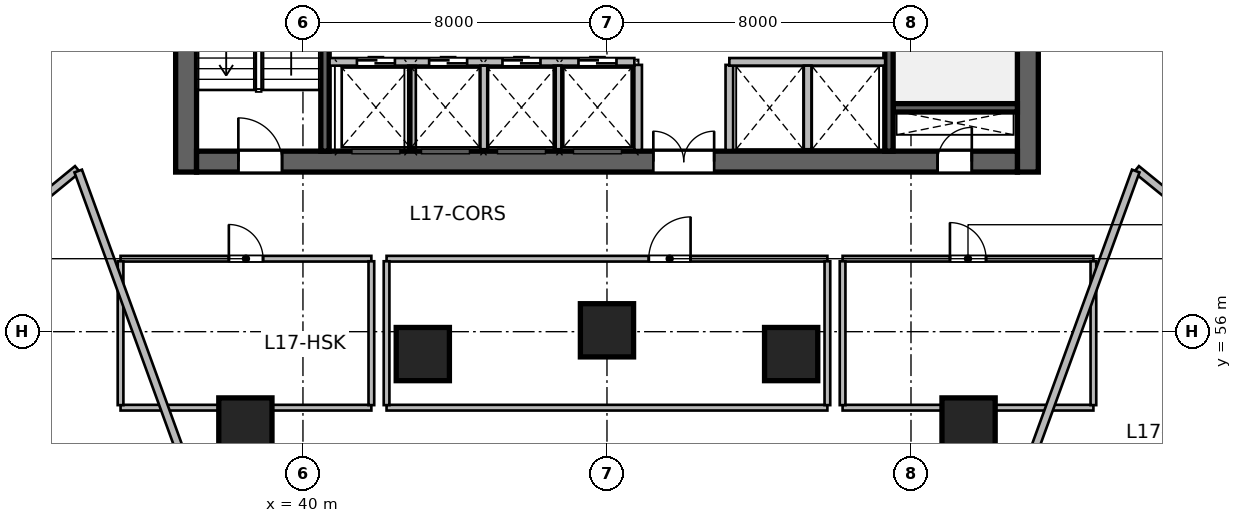
"""IFC4 building model, lengths in metres.
Left out: names, types, materials, properties, quantities, classifications, styles, units other than length and angle.
Written with IfcOpenShell. Run it as: python <this file> out.ifc"""

import sys

from ifc_helpers import new_model, si_unit, direction, frame, frame_2d, origin, origin_2d, place, context, subcontext, project, spatial, rectangle, circle, extrude, source, transform, mapped, element, fill, save


model = new_model("IFC4")
c1 = context("Model", 3, precision=1e-05, world=origin(), true_north=direction((0.0, 1.0)))
c2 = subcontext(c1, "Body", "Model", "MODEL_VIEW")
j1 = project(units=[si_unit("LENGTHUNIT", "METRE"), si_unit("PLANEANGLEUNIT", "RADIAN")], contexts=[c1])
p1 = place(None, origin())
s1 = spatial("IfcSite", under=j1, at=p1, CompositionType="ELEMENT")
p2 = place(p1, origin())
s2 = spatial("IfcBuilding", under=s1, at=p2, CompositionType="ELEMENT")
p3 = place(p2, frame((0.0, 0.0, 75.0)))
s3 = spatial("IfcBuildingStorey", under=s2, at=p3, CompositionType="ELEMENT", Elevation=75.0)
m1 = source(origin(), c2, "Body", "SweptSolid", [
    extrude(rectangle(XDim=12.0, YDim=0.55, at=frame_2d((6.0, 0.0))), origin(), (0.0, 0.0, 1.0), 3.6),
])
for number, where, z_axis, x_axis in (
    (1, (36.925, 60.2, 0.0), (0.0, 0.0, 1.0), (0.0, 1.0, 0.0)),
    (2, (59.075, 60.2, 0.0), (0.0, 0.0, 1.0), (0.0, 1.0, 0.0)),
):
    element("IfcWall", number, at=place(p3, frame(where, z_axis=z_axis, x_axis=x_axis)), inside=s3, PredefinedType="SHEAR", context=c2, shape_type="MappedRepresentation", body=[
        mapped(m1, transform((0.0, 0.0, 0.0), scale=1.0)),
    ])
m2 = source(origin(), c2, "Body", "SweptSolid", [
    extrude(rectangle(XDim=21.6, YDim=0.55, at=frame_2d((10.8, 0.0))), origin(), (0.0, 0.0, 1.0), 3.6),
])
p4 = place(p3, frame((37.2, 60.475, 0.0), z_axis=(0.0, 0.0, 1.0), x_axis=(1.0, 0.0, 0.0)))
e3 = element("IfcWall", 3, at=p4, inside=s3, PredefinedType="SHEAR", context=c2, shape_type="MappedRepresentation", body=[
    mapped(m2, transform((0.0, 0.0, 0.0), scale=1.0)),
])
p5 = place(p4, frame((1.1, 0.0, 0.0)))
e4 = element("IfcOpeningElement", 4, at=p5, cuts=e3, PredefinedType="OPENING", context=c2, shape_type="SweptSolid", body=[
    extrude(rectangle(XDim=1.15, YDim=2.15, at=frame_2d((0.575, 1.075))), frame((0.0, 0.285, 0.0), z_axis=(0.0, -1.0, 0.0), x_axis=(1.0, 0.0, 0.0)), (0.0, 0.0, 1.0), 0.57),
])
p6 = place(p4, frame((19.5, 0.0, 0.0)))
e5 = element("IfcOpeningElement", 5, at=p6, cuts=e3, PredefinedType="OPENING", context=c2, shape_type="SweptSolid", body=[
    extrude(rectangle(XDim=0.9, YDim=2.1, at=frame_2d((0.45, 1.05))), frame((0.0, 0.285, 0.0), z_axis=(0.0, -1.0, 0.0), x_axis=(1.0, 0.0, 0.0)), (0.0, 0.0, 1.0), 0.57),
])
p7 = place(p4, frame((12.02, 0.0, 0.0)))
e6 = element("IfcOpeningElement", 6, at=p7, cuts=e3, PredefinedType="OPENING", context=c2, shape_type="SweptSolid", body=[
    extrude(rectangle(XDim=1.6, YDim=2.15, at=frame_2d((0.8, 1.075))), frame((0.0, 0.285, 0.0), z_axis=(0.0, -1.0, 0.0), x_axis=(1.0, 0.0, 0.0)), (0.0, 0.0, 1.0), 0.57),
])
m3 = source(origin(), c2, "Body", "SweptSolid", [
    extrude(rectangle(XDim=3.27, YDim=0.22, at=frame_2d((1.635, 0.0))), origin(), (0.0, 0.0, 1.0), 3.6),
])
p8 = place(p3, frame((55.53, 61.89, 0.0), z_axis=(0.0, 0.0, 1.0), x_axis=(1.0, 0.0, 0.0)))
e7 = element("IfcWall", 7, at=p8, inside=s3, PredefinedType="SHEAR", context=c2, shape_type="MappedRepresentation", body=[
    mapped(m3, transform((0.0, 0.0, 0.0), scale=1.0)),
])
m4 = source(origin(), c2, "Body", "SweptSolid", [
    extrude(rectangle(XDim=10.9, YDim=0.22, at=frame_2d((5.45, 0.0))), origin(), (0.0, 0.0, 1.0), 3.6),
])
p9 = place(p3, frame((40.58, 60.75, 0.0), z_axis=(0.0, 0.0, 1.0), x_axis=(0.0, 1.0, 0.0)))
e8 = element("IfcWall", 8, at=p9, inside=s3, PredefinedType="SHEAR", context=c2, shape_type="MappedRepresentation", body=[
    mapped(m4, transform((0.0, 0.0, 0.0), scale=1.0)),
])
p10 = place(p3, frame((55.42, 60.75, 0.0), z_axis=(0.0, 0.0, 1.0), x_axis=(0.0, 1.0, 0.0)))
e9 = element("IfcWall", 9, at=p10, inside=s3, PredefinedType="SHEAR", context=c2, shape_type="MappedRepresentation", body=[
    mapped(m4, transform((0.0, 0.0, 0.0), scale=1.0)),
])
p11 = place(p10, frame((9.495, 0.0, 0.0)))
e10 = element("IfcOpeningElement", 10, at=p11, cuts=e9, PredefinedType="OPENING", context=c2, shape_type="SweptSolid", body=[
    extrude(rectangle(XDim=1.15, YDim=2.15, at=frame_2d((0.575, 1.075))), frame((0.0, 0.12, 0.0), z_axis=(0.0, -1.0, 0.0), x_axis=(1.0, 0.0, 0.0)), (0.0, 0.0, 1.0), 0.24),
])
m5 = source(origin(), c2, "Body", "SweptSolid", [
    extrude(circle(Radius=0.7, at=origin_2d()), origin(), (0.0, 0.0, 1.0), 3.6),
])
for number, where, z_axis, x_axis in (
    (11, (38.485, 53.558, 0.0), (0.0, 0.0, 1.0), (-0.289, 0.957, 0.0)),
    (12, (43.154, 55.411, 0.0), (0.0, 0.0, 1.0), (-0.143, 0.99, 0.0)),
    (13, (48.0, 56.036, 0.0), (0.0, 0.0, 1.0), (0.0, 1.0, 0.0)),
    (14, (52.846, 55.411, 0.0), (0.0, 0.0, 1.0), (0.143, 0.99, 0.0)),
    (15, (57.515, 53.558, 0.0), (0.0, 0.0, 1.0), (0.289, 0.957, 0.0)),
):
    element("IfcColumn", number, at=place(p3, frame(where, z_axis=z_axis, x_axis=x_axis)), inside=s3, PredefinedType="COLUMN", context=c2, shape_type="MappedRepresentation", body=[
        mapped(m5, transform((0.0, 0.0, 0.0), scale=1.0)),
    ])
m6 = source(origin(), c2, "Body", "SweptSolid", [
    extrude(rectangle(XDim=2.24, YDim=0.2, at=frame_2d((1.12, 0.0))), origin(), (0.0, 0.0, 1.0), 3.36),
])
for number, where, z_axis, x_axis in (
    (16, (48.82, 60.78, 0.0), (0.0, 0.0, 1.0), (0.0, 1.0, 0.0)),
    (17, (51.22, 60.78, 0.0), (0.0, 0.0, 1.0), (0.0, 1.0, 0.0)),
):
    element("IfcWall", number, at=place(p3, frame(where, z_axis=z_axis, x_axis=x_axis)), inside=s3, PredefinedType="SOLIDWALL", context=c2, shape_type="MappedRepresentation", body=[
        mapped(m6, transform((0.0, 0.0, 0.0), scale=1.0)),
    ])
m7 = source(origin(), c2, "Body", "SweptSolid", [
    extrude(rectangle(XDim=8.02, YDim=0.2, at=frame_2d((4.01, 0.0))), origin(), (0.0, 0.0, 1.0), 3.36),
])
p12 = place(p3, frame((40.7, 63.1, 0.0), z_axis=(0.0, 0.0, 1.0), x_axis=(1.0, 0.0, 0.0)))
e18 = element("IfcWall", 18, at=p12, inside=s3, PredefinedType="SOLIDWALL", context=c2, shape_type="MappedRepresentation", body=[
    mapped(m7, transform((0.0, 0.0, 0.0), scale=1.0)),
])
p13 = place(p12, frame((0.72, 0.0, 0.0)))
e19 = element("IfcOpeningElement", 19, at=p13, cuts=e18, PredefinedType="OPENING", context=c2, shape_type="SweptSolid", body=[
    extrude(rectangle(XDim=1.0, YDim=2.15, at=frame_2d((0.5, 1.075))), frame((0.0, 0.11, 0.0), z_axis=(0.0, -1.0, 0.0), x_axis=(1.0, 0.0, 0.0)), (0.0, 0.0, 1.0), 0.22),
])
p14 = place(p12, frame((2.62, 0.0, 0.0)))
e20 = element("IfcOpeningElement", 20, at=p14, cuts=e18, PredefinedType="OPENING", context=c2, shape_type="SweptSolid", body=[
    extrude(rectangle(XDim=1.0, YDim=2.15, at=frame_2d((0.5, 1.075))), frame((0.0, 0.11, 0.0), z_axis=(0.0, -1.0, 0.0), x_axis=(1.0, 0.0, 0.0)), (0.0, 0.0, 1.0), 0.22),
])
p15 = place(p12, frame((4.55, 0.0, 0.0)))
e21 = element("IfcOpeningElement", 21, at=p15, cuts=e18, PredefinedType="OPENING", context=c2, shape_type="SweptSolid", body=[
    extrude(rectangle(XDim=1.0, YDim=2.15, at=frame_2d((0.5, 1.075))), frame((0.0, 0.11, 0.0), z_axis=(0.0, -1.0, 0.0), x_axis=(1.0, 0.0, 0.0)), (0.0, 0.0, 1.0), 0.22),
])
p16 = place(p12, frame((6.55, 0.0, 0.0)))
e22 = element("IfcOpeningElement", 22, at=p16, cuts=e18, PredefinedType="OPENING", context=c2, shape_type="SweptSolid", body=[
    extrude(rectangle(XDim=1.0, YDim=2.15, at=frame_2d((0.5, 1.075))), frame((0.0, 0.11, 0.0), z_axis=(0.0, -1.0, 0.0), x_axis=(1.0, 0.0, 0.0)), (0.0, 0.0, 1.0), 0.22),
])
m8 = source(origin(), c2, "Body", "SweptSolid", [
    extrude(rectangle(XDim=4.1, YDim=0.2, at=frame_2d((2.05, 0.0))), origin(), (0.0, 0.0, 1.0), 3.36),
])
p17 = place(p3, frame((51.22, 63.1, 0.0), z_axis=(0.0, 0.0, 1.0), x_axis=(1.0, 0.0, 0.0)))
e23 = element("IfcWall", 23, at=p17, inside=s3, PredefinedType="SOLIDWALL", context=c2, shape_type="MappedRepresentation", body=[
    mapped(m8, transform((0.0, 0.0, 0.0), scale=1.0)),
])
m9 = source(origin(), c2, "Body", "SweptSolid", [
    extrude(rectangle(XDim=2.2, YDim=0.2, at=frame_2d((1.1, 0.0))), origin(), (0.0, 0.0, 1.0), 3.36),
])
for number, where, z_axis, x_axis in (
    (24, (42.87, 60.8, 0.0), (0.0, 0.0, 1.0), (0.0, 1.0, 0.0)),
    (25, (44.77, 60.8, 0.0), (0.0, 0.0, 1.0), (0.0, 1.0, 0.0)),
    (26, (46.7, 60.8, 0.0), (0.0, 0.0, 1.0), (0.0, 1.0, 0.0)),
    (27, (53.28, 60.8, 0.0), (0.0, 0.0, 1.0), (0.0, 1.0, 0.0)),
):
    element("IfcWall", number, at=place(p3, frame(where, z_axis=z_axis, x_axis=x_axis)), inside=s3, PredefinedType="SOLIDWALL", context=c2, shape_type="MappedRepresentation", body=[
        mapped(m9, transform((0.0, 0.0, 0.0), scale=1.0)),
    ])
m10 = source(origin(), c2, "Body", "SweptSolid", [
    extrude(rectangle(XDim=6.6, YDim=0.15, at=frame_2d((3.3, 0.0))), origin(), (0.0, 0.0, 1.0), 2.803),
])
p18 = place(p3, frame((35.2, 54.0, 0.0), z_axis=(0.0, 0.0, 1.0), x_axis=(1.0, 0.0, 0.0)))
e28 = element("IfcWall", 28, at=p18, inside=s3, PredefinedType="PARTITIONING", context=c2, shape_type="MappedRepresentation", body=[
    mapped(m10, transform((0.0, 0.0, 0.0), scale=1.0)),
])
m11 = source(origin(), c2, "Body", "SweptSolid", [
    extrude(rectangle(XDim=6.6, YDim=0.15, at=frame_2d((3.3, 0.0))), origin(), (0.0, 0.0, 1.0), 3.36),
])
p19 = place(p3, frame((35.2, 57.92, 0.0), z_axis=(0.0, 0.0, 1.0), x_axis=(1.0, 0.0, 0.0)))
e29 = element("IfcWall", 29, at=p19, inside=s3, PredefinedType="PARTITIONING", context=c2, shape_type="MappedRepresentation", body=[
    mapped(m11, transform((0.0, 0.0, 0.0), scale=1.0)),
])
p20 = place(p19, frame((2.85, 0.0, 0.0)))
e30 = element("IfcOpeningElement", 30, at=p20, cuts=e29, PredefinedType="OPENING", context=c2, shape_type="SweptSolid", body=[
    extrude(rectangle(XDim=0.9, YDim=2.1, at=frame_2d((0.45, 1.05))), frame((0.0, 0.085, 0.0), z_axis=(0.0, -1.0, 0.0), x_axis=(1.0, 0.0, 0.0)), (0.0, 0.0, 1.0), 0.17),
])
m12 = source(origin(), c2, "Body", "SweptSolid", [
    extrude(rectangle(XDim=3.785, YDim=0.15, at=frame_2d((1.893, 0.0))), origin(), (0.0, 0.0, 1.0), 3.36),
])
for number, where, z_axis, x_axis in (
    (31, (35.2, 54.067, 0.0), (0.0, 0.0, 1.0), (0.0, 1.0, 0.0)),
    (32, (41.8, 54.067, 0.0), (0.0, 0.0, 1.0), (0.0, 1.0, 0.0)),
):
    element("IfcWall", number, at=place(p3, frame(where, z_axis=z_axis, x_axis=x_axis)), inside=s3, PredefinedType="PARTITIONING", context=c2, shape_type="MappedRepresentation", body=[
        mapped(m12, transform((0.0, 0.0, 0.0), scale=1.0)),
    ])
m13 = source(origin(), c2, "Body", "SweptSolid", [
    extrude(rectangle(XDim=11.6, YDim=0.15, at=frame_2d((5.8, 0.0))), origin(), (0.0, 0.0, 1.0), 3.36),
])
p21 = place(p3, frame((42.2, 54.0, 0.0), z_axis=(0.0, 0.0, 1.0), x_axis=(1.0, 0.0, 0.0)))
e33 = element("IfcWall", 33, at=p21, inside=s3, PredefinedType="PARTITIONING", context=c2, shape_type="MappedRepresentation", body=[
    mapped(m13, transform((0.0, 0.0, 0.0), scale=1.0)),
])
p22 = place(p3, frame((42.2, 57.92, 0.0), z_axis=(0.0, 0.0, 1.0), x_axis=(1.0, 0.0, 0.0)))
e34 = element("IfcWall", 34, at=p22, inside=s3, PredefinedType="PARTITIONING", context=c2, shape_type="MappedRepresentation", body=[
    mapped(m13, transform((0.0, 0.0, 0.0), scale=1.0)),
])
p23 = place(p22, frame((6.9, 0.0, 0.0)))
e35 = element("IfcOpeningElement", 35, at=p23, cuts=e34, PredefinedType="OPENING", context=c2, shape_type="SweptSolid", body=[
    extrude(rectangle(XDim=1.1, YDim=2.15, at=frame_2d((0.55, 1.075))), frame((0.0, 0.085, 0.0), z_axis=(0.0, -1.0, 0.0), x_axis=(1.0, 0.0, 0.0)), (0.0, 0.0, 1.0), 0.17),
])
for number, where, z_axis, x_axis in (
    (36, (42.2, 54.067, 0.0), (0.0, 0.0, 1.0), (0.0, 1.0, 0.0)),
    (37, (53.8, 54.067, 0.0), (0.0, 0.0, 1.0), (0.0, 1.0, 0.0)),
):
    element("IfcWall", number, at=place(p3, frame(where, z_axis=z_axis, x_axis=x_axis)), inside=s3, PredefinedType="PARTITIONING", context=c2, shape_type="MappedRepresentation", body=[
        mapped(m12, transform((0.0, 0.0, 0.0), scale=1.0)),
    ])
p24 = place(p3, frame((54.2, 54.0, 0.0), z_axis=(0.0, 0.0, 1.0), x_axis=(1.0, 0.0, 0.0)))
e38 = element("IfcWall", 38, at=p24, inside=s3, PredefinedType="PARTITIONING", context=c2, shape_type="MappedRepresentation", body=[
    mapped(m10, transform((0.0, 0.0, 0.0), scale=1.0)),
])
p25 = place(p3, frame((54.2, 57.92, 0.0), z_axis=(0.0, 0.0, 1.0), x_axis=(1.0, 0.0, 0.0)))
e39 = element("IfcWall", 39, at=p25, inside=s3, PredefinedType="PARTITIONING", context=c2, shape_type="MappedRepresentation", body=[
    mapped(m11, transform((0.0, 0.0, 0.0), scale=1.0)),
])
p26 = place(p25, frame((2.825, 0.0, 0.0)))
e40 = element("IfcOpeningElement", 40, at=p26, cuts=e39, PredefinedType="OPENING", context=c2, shape_type="SweptSolid", body=[
    extrude(rectangle(XDim=0.95, YDim=2.1, at=frame_2d((0.475, 1.05))), frame((0.0, 0.085, 0.0), z_axis=(0.0, -1.0, 0.0), x_axis=(1.0, 0.0, 0.0)), (0.0, 0.0, 1.0), 0.17),
])
for number, where, z_axis, x_axis in (
    (41, (54.2, 54.067, 0.0), (0.0, 0.0, 1.0), (0.0, 1.0, 0.0)),
    (42, (60.8, 54.067, 0.0), (0.0, 0.0, 1.0), (0.0, 1.0, 0.0)),
):
    element("IfcWall", number, at=place(p3, frame(where, z_axis=z_axis, x_axis=x_axis)), inside=s3, PredefinedType="PARTITIONING", context=c2, shape_type="MappedRepresentation", body=[
        mapped(m12, transform((0.0, 0.0, 0.0), scale=1.0)),
    ])
m14 = source(origin(), c2, "Body", "SweptSolid", [
    extrude(rectangle(XDim=6.721, YDim=0.21, at=frame_2d((3.361, 0.0))), origin(), (0.0, 0.0, 1.0), 3.36),
])
p27 = place(p3, frame((28.874, 56.01, 0.0), z_axis=(0.0, 0.0, 1.0), x_axis=(0.772828051199, 0.63461547671, 0.0)))
e43 = element("IfcWall", 43, at=p27, inside=s3, PredefinedType="PARTITIONING", context=c2, shape_type="MappedRepresentation", body=[
    mapped(m14, transform((0.0, 0.0, 0.0), scale=1.0)),
])
m15 = source(origin(), c2, "Body", "SweptSolid", [
    extrude(rectangle(XDim=12.196, YDim=0.21, at=frame_2d((6.098, 0.0))), origin(), (0.0, 0.0, 1.0), 3.36),
])
p28 = place(p3, frame((38.258, 48.766, 0.0), z_axis=(0.0, 0.0, 1.0), x_axis=(-0.342022711534, 0.939691686031, 0.0)))
e44 = element("IfcWall", 44, at=p28, inside=s3, PredefinedType="PARTITIONING", context=c2, shape_type="MappedRepresentation", body=[
    mapped(m15, transform((0.0, 0.0, 0.0), scale=1.0)),
])
m16 = source(origin(), c2, "Body", "SweptSolid", [
    extrude(rectangle(XDim=6.408, YDim=0.21, at=frame_2d((3.204, 0.0))), origin(), (0.0, 0.0, 1.0), 3.36),
])
p29 = place(p3, frame((61.931, 60.275, 0.0), z_axis=(0.0, 0.0, 1.0), x_axis=(0.775878552904, -0.630882295792, 0.0)))
e45 = element("IfcWall", 45, at=p29, inside=s3, PredefinedType="PARTITIONING", context=c2, shape_type="MappedRepresentation", body=[
    mapped(m16, transform((0.0, 0.0, 0.0), scale=1.0)),
])
p30 = place(p29, frame((1.063, 0.0, 0.0)))
e46 = element("IfcOpeningElement", 46, at=p30, cuts=e45, PredefinedType="OPENING", context=c2, shape_type="SweptSolid", body=[
    extrude(rectangle(XDim=0.95, YDim=2.15, at=frame_2d((0.475, 1.075))), frame((0.0, 0.115, 0.0), z_axis=(0.0, -1.0, 0.0), x_axis=(1.0, 0.0, 0.0)), (0.0, 0.0, 1.0), 0.23),
])
p31 = place(p3, frame((57.742, 48.766, 0.0), z_axis=(0.0, 0.0, 1.0), x_axis=(0.342022711534, 0.939691686031, 0.0)))
e47 = element("IfcWall", 47, at=p31, inside=s3, PredefinedType="PARTITIONING", context=c2, shape_type="MappedRepresentation", body=[
    mapped(m15, transform((0.0, 0.0, 0.0), scale=1.0)),
])
m17 = source(origin(), c2, "Body", "SweptSolid", [
    extrude(rectangle(XDim=11.692, YDim=0.21, at=frame_2d((5.846, 0.0))), origin(), (0.0, 0.0, 1.0), 2.99),
])
p32 = place(p3, frame((61.228, 45.954, 0.0), z_axis=(0.0, 0.0, 1.0), x_axis=(0.483398579324, 0.875400373262, 0.0)))
e48 = element("IfcWall", 48, at=p32, inside=s3, PredefinedType="PARTITIONING", context=c2, shape_type="MappedRepresentation", body=[
    mapped(m17, transform((0.0, 0.0, 0.0), scale=1.0)),
])
m18 = source(origin(), c2, "Body", "SweptSolid", [
    extrude(rectangle(XDim=1.15, YDim=2.15, at=frame_2d((0.575, 1.075))), frame((0.0, 0.025, 0.0), z_axis=(0.0, -1.0, 0.0), x_axis=(1.0, 0.0, 0.0)), (0.0, 0.0, 1.0), 0.05),
])
p33 = place(p5, origin())
e49 = element("IfcDoor", 49, at=p33, inside=s3, OperationType="SINGLE_SWING_LEFT", PredefinedType="DOOR", context=c2, shape_type="MappedRepresentation", body=[
    mapped(m18, transform((0.0, 0.0, 0.0), scale=1.0)),
])
fill(e4, e49)
m19 = source(origin(), c2, "Body", "SweptSolid", [
    extrude(rectangle(XDim=0.9, YDim=2.1, at=frame_2d((0.45, 1.05))), frame((0.0, 0.025, 0.0), z_axis=(0.0, -1.0, 0.0), x_axis=(1.0, 0.0, 0.0)), (0.0, 0.0, 1.0), 0.05),
])
p34 = place(p6, origin())
e50 = element("IfcDoor", 50, at=p34, inside=s3, OperationType="SINGLE_SWING_RIGHT", PredefinedType="DOOR", context=c2, shape_type="MappedRepresentation", body=[
    mapped(m19, transform((0.0, 0.0, 0.0), scale=1.0)),
])
fill(e5, e50)
m20 = source(origin(), c2, "Body", "SweptSolid", [
    extrude(rectangle(XDim=1.6, YDim=2.15, at=frame_2d((0.8, 1.075))), frame((0.0, 0.025, 0.0), z_axis=(0.0, -1.0, 0.0), x_axis=(1.0, 0.0, 0.0)), (0.0, 0.0, 1.0), 0.05),
])
p35 = place(p7, origin())
e51 = element("IfcDoor", 51, at=p35, inside=s3, OperationType="DOUBLE_DOOR_SINGLE_SWING", PredefinedType="DOOR", context=c2, shape_type="MappedRepresentation", body=[
    mapped(m20, transform((0.0, 0.0, 0.0), scale=1.0)),
])
fill(e6, e51)
m21 = source(origin(), c2, "Body", "SweptSolid", [
    extrude(rectangle(XDim=1.0, YDim=2.15, at=frame_2d((0.5, 1.075))), frame((0.0, 0.025, 0.0), z_axis=(0.0, -1.0, 0.0), x_axis=(1.0, 0.0, 0.0)), (0.0, 0.0, 1.0), 0.05),
])
p36 = place(p13, origin())
e52 = element("IfcDoor", 52, at=p36, inside=s3, OperationType="DOUBLE_DOOR_SLIDING", PredefinedType="DOOR", context=c2, shape_type="MappedRepresentation", body=[
    mapped(m21, transform((0.0, 0.0, 0.0), scale=1.0)),
])
fill(e19, e52)
p37 = place(p14, origin())
e53 = element("IfcDoor", 53, at=p37, inside=s3, OperationType="DOUBLE_DOOR_SLIDING", PredefinedType="DOOR", context=c2, shape_type="MappedRepresentation", body=[
    mapped(m21, transform((0.0, 0.0, 0.0), scale=1.0)),
])
fill(e20, e53)
p38 = place(p15, origin())
e54 = element("IfcDoor", 54, at=p38, inside=s3, OperationType="DOUBLE_DOOR_SLIDING", PredefinedType="DOOR", context=c2, shape_type="MappedRepresentation", body=[
    mapped(m21, transform((0.0, 0.0, 0.0), scale=1.0)),
])
fill(e21, e54)
p39 = place(p16, origin())
e55 = element("IfcDoor", 55, at=p39, inside=s3, OperationType="DOUBLE_DOOR_SLIDING", PredefinedType="DOOR", context=c2, shape_type="MappedRepresentation", body=[
    mapped(m21, transform((0.0, 0.0, 0.0), scale=1.0)),
])
fill(e22, e55)
p40 = place(p20, origin())
e56 = element("IfcDoor", 56, at=p40, inside=s3, OperationType="SINGLE_SWING_LEFT", PredefinedType="DOOR", context=c2, shape_type="MappedRepresentation", body=[
    mapped(m19, transform((0.0, 0.0, 0.0), scale=1.0)),
])
fill(e30, e56)
m22 = source(origin(), c2, "Body", "SweptSolid", [
    extrude(rectangle(XDim=1.1, YDim=2.15, at=frame_2d((0.55, 1.075))), frame((0.0, 0.025, 0.0), z_axis=(0.0, -1.0, 0.0), x_axis=(1.0, 0.0, 0.0)), (0.0, 0.0, 1.0), 0.05),
])
p41 = place(p23, origin())
e57 = element("IfcDoor", 57, at=p41, inside=s3, OperationType="SINGLE_SWING_RIGHT", PredefinedType="DOOR", context=c2, shape_type="MappedRepresentation", body=[
    mapped(m22, transform((0.0, 0.0, 0.0), scale=1.0)),
])
fill(e35, e57)
m23 = source(origin(), c2, "Body", "SweptSolid", [
    extrude(rectangle(XDim=0.95, YDim=2.1, at=frame_2d((0.475, 1.05))), frame((0.0, 0.025, 0.0), z_axis=(0.0, -1.0, 0.0), x_axis=(1.0, 0.0, 0.0)), (0.0, 0.0, 1.0), 0.05),
])
p42 = place(p26, origin())
e58 = element("IfcDoor", 58, at=p42, inside=s3, OperationType="SINGLE_SWING_LEFT", PredefinedType="DOOR", context=c2, shape_type="MappedRepresentation", body=[
    mapped(m23, transform((0.0, 0.0, 0.0), scale=1.0)),
])
fill(e40, e58)
save(model, sys.argv[1])
